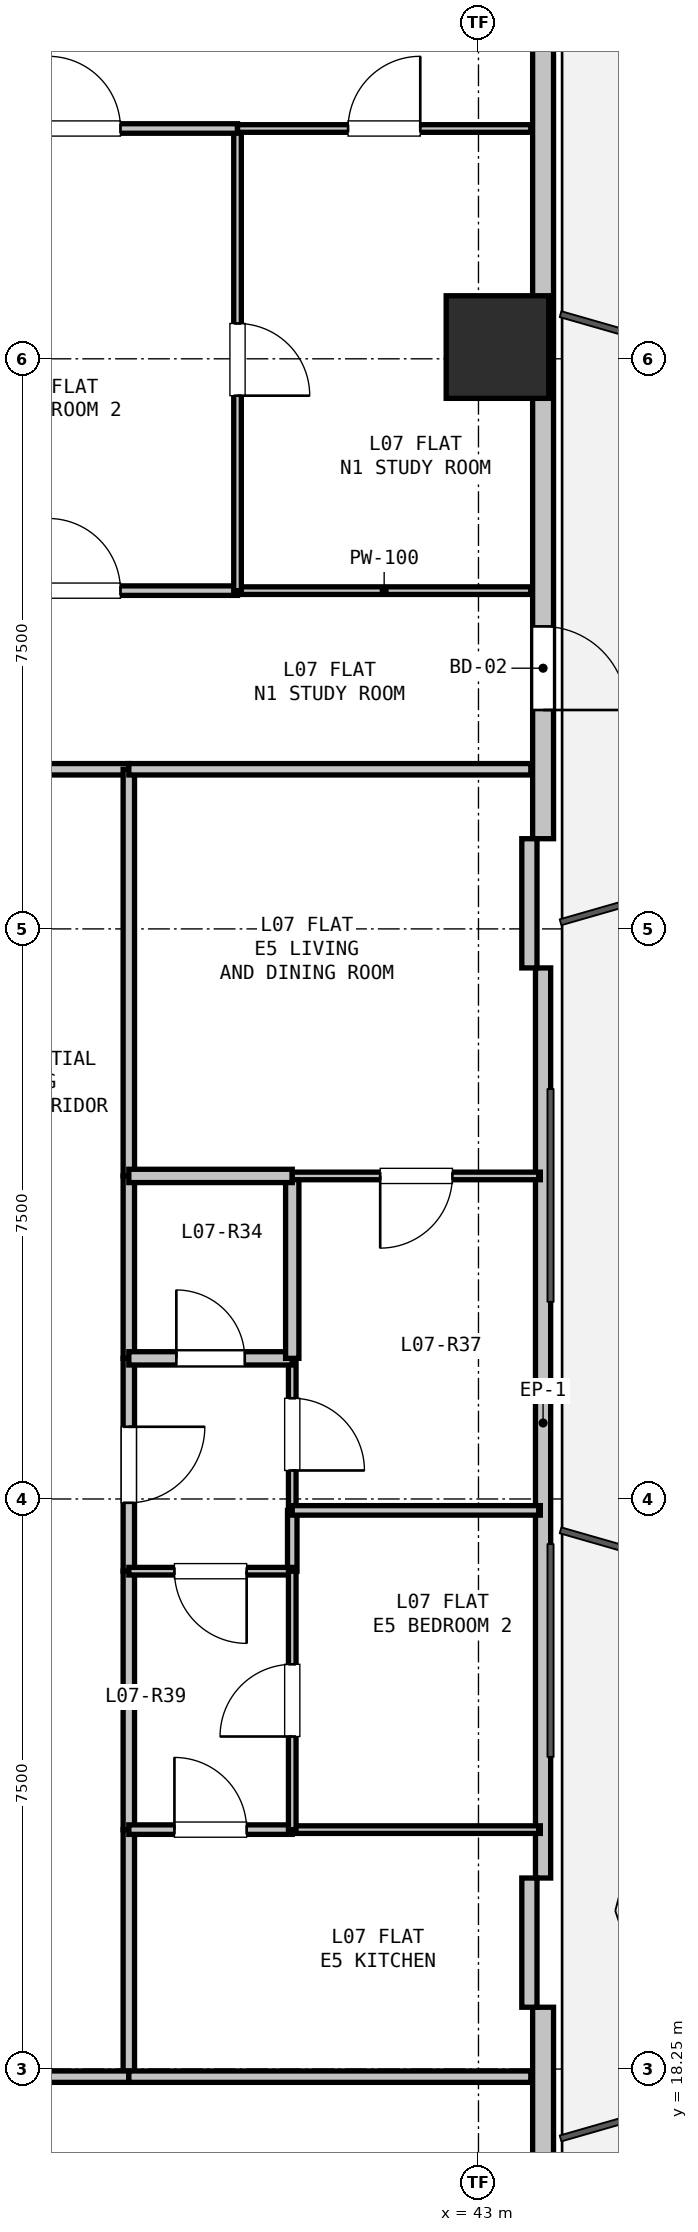
"""IFC4 building model, lengths in metres.
Left out: names, types, materials, properties, quantities, classifications, styles, units other than length and angle.
Written with IfcOpenShell. Run it as: python <this file> out.ifc"""

import sys

from ifc_helpers import new_model, si_unit, direction, frame, frame_2d, origin, origin_2d, place, context, subcontext, project, spatial, rectangle, hollow_rectangle, extrude, element, fill, save


model = new_model("IFC4")
c1 = context("Model", 3, precision=1e-05, world=origin(), true_north=direction((0.0, 1.0)))
c2 = subcontext(c1, "Body", "Model", "MODEL_VIEW")
j1 = project(units=[si_unit("LENGTHUNIT", "METRE"), si_unit("PLANEANGLEUNIT", "RADIAN")], contexts=[c1])
p1 = place(None, origin())
s1 = spatial("IfcSite", under=j1, at=p1, CompositionType="ELEMENT")
p2 = place(p1, origin())
s2 = spatial("IfcBuilding", under=s1, at=p2, CompositionType="ELEMENT")
p3 = place(p2, frame((0.0, 0.0, 29.1)))
s3 = spatial("IfcBuildingStorey", under=s2, at=p3, CompositionType="ELEMENT", Elevation=29.1)
p4 = place(p3, frame((43.25, 40.905, 0.0), z_axis=(0.0, 0.0, 1.0), x_axis=(1.0, 0.0, 0.0)))
e1 = element("IfcColumn", 1, at=p4, inside=s3, PredefinedType="COLUMN", context=c2, shape_type="SweptSolid", body=[
    extrude(hollow_rectangle(XDim=1.35, YDim=1.35, WallThickness=0.036, at=origin_2d()), origin(), (0.0, 0.0, 1.0), 3.3),
])
p5 = place(p3, frame((28.232, 43.454, 0.0), z_axis=(0.0, 0.0, 1.0), x_axis=(0.86603192154, 0.499988710747, 0.0)))
e2 = element("IfcWall", 2, at=p5, inside=s3, PredefinedType="SOLIDWALL", context=c2, shape_type="SweptSolid", body=[
    extrude(rectangle(XDim=12.673, YDim=0.275, at=frame_2d((6.336, 0.0))), origin(), (0.0, 0.0, 1.0), 2.66),
])
p6 = place(p5, frame((4.68, 0.0, 0.9)))
e3 = element("IfcOpeningElement", 3, at=p6, cuts=e2, PredefinedType="OPENING", context=c2, shape_type="SweptSolid", body=[
    extrude(rectangle(XDim=1.2, YDim=1.4, at=frame_2d((0.6, 0.7))), frame((0.0, 0.147, 0.0), z_axis=(0.0, -1.0, 0.0), x_axis=(1.0, 0.0, 0.0)), (0.0, 0.0, 1.0), 0.295),
])
p7 = place(p3, frame((43.85, 47.11, 0.0), z_axis=(0.0, 0.0, 1.0), x_axis=(0.0, -1.0, 0.0)))
e4 = element("IfcWall", 4, at=p7, inside=s3, PredefinedType="SOLIDWALL", context=c2, shape_type="SweptSolid", body=[
    extrude(rectangle(XDim=12.673, YDim=0.275, at=frame_2d((6.336, 0.0))), origin(), (0.0, 0.0, 1.0), 2.66),
])
p8 = place(p7, frame((9.88, 0.0, 0.0)))
e5 = element("IfcOpeningElement", 5, at=p8, cuts=e4, PredefinedType="OPENING", context=c2, shape_type="SweptSolid", body=[
    extrude(rectangle(XDim=1.1, YDim=2.1, at=frame_2d((0.55, 1.05))), frame((0.0, 0.147, 0.0), z_axis=(0.0, -1.0, 0.0), x_axis=(1.0, 0.0, 0.0)), (0.0, 0.0, 1.0), 0.295),
])
p9 = place(p3, frame((43.85, 32.737, 0.0), z_axis=(0.0, 0.0, 1.0), x_axis=(0.0, -1.0, 0.0)))
e6 = element("IfcWall", 6, at=p9, inside=s3, PredefinedType="PARAPET", context=c2, shape_type="SweptSolid", body=[
    extrude(rectangle(XDim=11.973, YDim=0.2, at=frame_2d((5.987, 0.0))), origin(), (0.0, 0.0, 1.0), 0.2),
])
p10 = place(p3, frame((43.85, 19.063, 0.0), z_axis=(0.0, 0.0, 1.0), x_axis=(0.0, -1.0, 0.0)))
e7 = element("IfcWall", 7, at=p10, inside=s3, PredefinedType="SOLIDWALL", context=c2, shape_type="SweptSolid", body=[
    extrude(rectangle(XDim=12.673, YDim=0.275, at=frame_2d((6.336, 0.0))), origin(), (0.0, 0.0, 1.0), 2.66),
])
for number, where, z_axis, x_axis in (
    (8, (43.67, 34.437, 0.0), (0.0, 0.0, 1.0), (0.0, -1.0, 0.0)),
    (9, (43.67, 20.763, 0.0), (0.0, 0.0, 1.0), (0.0, -1.0, 0.0)),
):
    element("IfcWall", number, at=place(p3, frame(where, z_axis=z_axis, x_axis=x_axis)), inside=s3, PredefinedType="PARAPET", context=c2, shape_type="SweptSolid", body=[
        extrude(rectangle(XDim=1.7, YDim=0.2, at=frame_2d((0.85, 0.0))), origin(), (0.0, 0.0, 1.0), 2.66),
    ])
p11 = place(p3, frame((35.8, 35.35, 0.0), z_axis=(0.0, 0.0, 1.0), x_axis=(1.0, 0.0, 0.0)))
e10 = element("IfcWall", 10, at=p11, inside=s3, PredefinedType="PARTITIONING", context=c2, shape_type="SweptSolid", body=[
    extrude(rectangle(XDim=2.6, YDim=0.15, at=frame_2d((1.3, 0.0))), origin(), (0.0, 0.0, 1.0), 2.337),
])
p12 = place(p3, frame((38.4, 35.35, 0.0), z_axis=(0.0, 0.0, 1.0), x_axis=(0.0, -1.0, 0.0)))
e11 = element("IfcWall", 11, at=p12, inside=s3, PredefinedType="PARTITIONING", context=c2, shape_type="SweptSolid", body=[
    extrude(rectangle(XDim=5.35, YDim=0.15, at=frame_2d((2.675, 0.0))), origin(), (0.0, 0.0, 1.0), 2.337),
])
p13 = place(p3, frame((38.4, 30.0, 0.0), z_axis=(0.0, 0.0, 1.0), x_axis=(0.0, -1.0, 0.0)))
e12 = element("IfcWall", 12, at=p13, inside=s3, PredefinedType="PARTITIONING", context=c2, shape_type="SweptSolid", body=[
    extrude(rectangle(XDim=2.4, YDim=0.15, at=frame_2d((1.2, 0.0))), origin(), (0.0, 0.0, 1.0), 3.04),
])
p14 = place(p3, frame((38.4, 27.6, 0.0), z_axis=(0.0, 0.0, 1.0), x_axis=(0.0, -1.0, 0.0)))
e13 = element("IfcWall", 13, at=p14, inside=s3, PredefinedType="PARTITIONING", context=c2, shape_type="SweptSolid", body=[
    extrude(rectangle(XDim=2.8, YDim=0.15, at=frame_2d((1.4, 0.0))), origin(), (0.0, 0.0, 1.0), 3.04),
])
p15 = place(p14, frame((0.9, 0.0, 0.0)))
e14 = element("IfcOpeningElement", 14, at=p15, cuts=e13, PredefinedType="OPENING", context=c2, shape_type="SweptSolid", body=[
    extrude(rectangle(XDim=1.0, YDim=2.15, at=frame_2d((0.5, 1.075))), frame((0.0, 0.085, 0.0), z_axis=(0.0, -1.0, 0.0), x_axis=(1.0, 0.0, 0.0)), (0.0, 0.0, 1.0), 0.17),
])
p16 = place(p3, frame((38.4, 24.8, 0.0), z_axis=(0.0, 0.0, 1.0), x_axis=(0.0, -1.0, 0.0)))
e15 = element("IfcWall", 15, at=p16, inside=s3, PredefinedType="PARTITIONING", context=c2, shape_type="SweptSolid", body=[
    extrude(rectangle(XDim=3.4, YDim=0.15, at=frame_2d((1.7, 0.0))), origin(), (0.0, 0.0, 1.0), 3.04),
])
p17 = place(p3, frame((38.4, 21.4, 0.0), z_axis=(0.0, 0.0, 1.0), x_axis=(0.0, -1.0, 0.0)))
e16 = element("IfcWall", 16, at=p17, inside=s3, PredefinedType="PARTITIONING", context=c2, shape_type="SweptSolid", body=[
    extrude(rectangle(XDim=3.25, YDim=0.15, at=frame_2d((1.625, 0.0))), origin(), (0.0, 0.0, 1.0), 3.04),
])
p18 = place(p3, frame((38.4, 18.15, 0.0), z_axis=(0.0, 0.0, 1.0), x_axis=(-1.0, 0.0, 0.0)))
e17 = element("IfcWall", 17, at=p18, inside=s3, PredefinedType="PARTITIONING", context=c2, shape_type="SweptSolid", body=[
    extrude(rectangle(XDim=2.6, YDim=0.15, at=frame_2d((1.3, 0.0))), origin(), (0.0, 0.0, 1.0), 2.337),
])
p19 = place(p3, frame((40.55, 27.6, 0.0), z_axis=(0.0, 0.0, 1.0), x_axis=(0.0, -1.0, 0.0)))
e18 = element("IfcWall", 18, at=p19, inside=s3, PredefinedType="PARTITIONING", context=c2, shape_type="SweptSolid", body=[
    extrude(rectangle(XDim=2.0, YDim=0.1, at=frame_2d((1.0, 0.0))), origin(), (0.0, 0.0, 1.0), 3.04),
])
p20 = place(p19, frame((0.525, 0.0, 0.0)))
e19 = element("IfcOpeningElement", 19, at=p20, cuts=e18, PredefinedType="OPENING", context=c2, shape_type="SweptSolid", body=[
    extrude(rectangle(XDim=0.95, YDim=2.1, at=frame_2d((0.475, 1.05))), frame((0.0, 0.06, 0.0), z_axis=(0.0, -1.0, 0.0), x_axis=(1.0, 0.0, 0.0)), (0.0, 0.0, 1.0), 0.12),
])
p21 = place(p3, frame((40.55, 25.6, 0.0), z_axis=(0.0, 0.0, 1.0), x_axis=(0.0, -1.0, 0.0)))
e20 = element("IfcWall", 20, at=p21, inside=s3, PredefinedType="PARTITIONING", context=c2, shape_type="SweptSolid", body=[
    extrude(rectangle(XDim=0.8, YDim=0.125, at=frame_2d((0.4, 0.0))), origin(), (0.0, 0.0, 1.0), 3.04),
])
p22 = place(p3, frame((40.55, 24.8, 0.0), z_axis=(0.0, 0.0, 1.0), x_axis=(-1.0, 0.0, 0.0)))
e21 = element("IfcWall", 21, at=p22, inside=s3, PredefinedType="PARTITIONING", context=c2, shape_type="SweptSolid", body=[
    extrude(rectangle(XDim=2.15, YDim=0.1, at=frame_2d((1.075, 0.0))), origin(), (0.0, 0.0, 1.0), 3.04),
])
p23 = place(p22, frame((0.6, 0.0, 0.0)))
e22 = element("IfcOpeningElement", 22, at=p23, cuts=e21, PredefinedType="OPENING", context=c2, shape_type="SweptSolid", body=[
    extrude(rectangle(XDim=0.95, YDim=2.1, at=frame_2d((0.475, 1.05))), frame((0.0, 0.06, 0.0), z_axis=(0.0, -1.0, 0.0), x_axis=(1.0, 0.0, 0.0)), (0.0, 0.0, 1.0), 0.12),
])
p24 = place(p3, frame((38.4, 27.6, 0.0), z_axis=(0.0, 0.0, 1.0), x_axis=(1.0, 0.0, 0.0)))
e23 = element("IfcWall", 23, at=p24, inside=s3, PredefinedType="PLUMBINGWALL", context=c2, shape_type="SweptSolid", body=[
    extrude(rectangle(XDim=2.15, YDim=0.175, at=frame_2d((1.075, 0.0))), origin(), (0.0, 0.0, 1.0), 3.04),
])
p25 = place(p24, frame((0.625, 0.0, 0.0)))
e24 = element("IfcOpeningElement", 24, at=p25, cuts=e23, PredefinedType="OPENING", context=c2, shape_type="SweptSolid", body=[
    extrude(rectangle(XDim=0.9, YDim=2.1, at=frame_2d((0.45, 1.05))), frame((0.0, 0.097, 0.0), z_axis=(0.0, -1.0, 0.0), x_axis=(1.0, 0.0, 0.0)), (0.0, 0.0, 1.0), 0.195),
])
p26 = place(p3, frame((38.4, 18.15, 0.0), z_axis=(0.0, 0.0, 1.0), x_axis=(1.0, 0.0, 0.0)))
e25 = element("IfcWall", 25, at=p26, inside=s3, PredefinedType="PARTITIONING", context=c2, shape_type="SweptSolid", body=[
    extrude(rectangle(XDim=5.289, YDim=0.15, at=frame_2d((2.644, 0.0))), origin(), (0.0, 0.0, 1.0), 2.365),
])
p27 = place(p3, frame((40.55, 30.0, 0.0), z_axis=(0.0, 0.0, 1.0), x_axis=(0.0, -1.0, 0.0)))
e26 = element("IfcWall", 26, at=p27, inside=s3, PredefinedType="PLUMBINGWALL", context=c2, shape_type="SweptSolid", body=[
    extrude(rectangle(XDim=2.4, YDim=0.175, at=frame_2d((1.2, 0.0))), origin(), (0.0, 0.0, 1.0), 3.04),
])
p28 = place(p3, frame((38.4, 30.0, 0.0), z_axis=(0.0, 0.0, 1.0), x_axis=(1.0, 0.0, 0.0)))
e27 = element("IfcWall", 27, at=p28, inside=s3, PredefinedType="PLUMBINGWALL", context=c2, shape_type="SweptSolid", body=[
    extrude(rectangle(XDim=2.15, YDim=0.175, at=frame_2d((1.075, 0.0))), origin(), (0.0, 0.0, 1.0), 3.04),
])
p29 = place(p3, frame((38.4, 21.4, 0.0), z_axis=(0.0, 0.0, 1.0), x_axis=(1.0, 0.0, 0.0)))
e28 = element("IfcWall", 28, at=p29, inside=s3, PredefinedType="PARTITIONING", context=c2, shape_type="SweptSolid", body=[
    extrude(rectangle(XDim=2.15, YDim=0.125, at=frame_2d((1.075, 0.0))), origin(), (0.0, 0.0, 1.0), 3.04),
])
p30 = place(p29, frame((0.6, 0.0, 0.0)))
e29 = element("IfcOpeningElement", 29, at=p30, cuts=e28, PredefinedType="OPENING", context=c2, shape_type="SweptSolid", body=[
    extrude(rectangle(XDim=0.95, YDim=2.1, at=frame_2d((0.475, 1.05))), frame((0.0, 0.073, 0.0), z_axis=(0.0, -1.0, 0.0), x_axis=(1.0, 0.0, 0.0)), (0.0, 0.0, 1.0), 0.145),
])
p31 = place(p3, frame((40.55, 21.4, 0.0), z_axis=(0.0, 0.0, 1.0), x_axis=(1.0, 0.0, 0.0)))
e30 = element("IfcWall", 30, at=p31, inside=s3, PredefinedType="PARTITIONING", context=c2, shape_type="SweptSolid", body=[
    extrude(rectangle(XDim=3.264, YDim=0.1, at=frame_2d((1.632, 0.0))), origin(), (0.0, 0.0, 1.0), 2.365),
])
p32 = place(p3, frame((43.688, 35.35, 0.0), z_axis=(0.0, 0.0, 1.0), x_axis=(-1.0, 0.0, 0.0)))
e31 = element("IfcWall", 31, at=p32, inside=s3, PredefinedType="PARTITIONING", context=c2, shape_type="SweptSolid", body=[
    extrude(rectangle(XDim=5.289, YDim=0.15, at=frame_2d((2.644, 0.0))), origin(), (0.0, 0.0, 1.0), 2.337),
])
p33 = place(p3, frame((35.8, 37.7, 0.0), z_axis=(0.0, 0.0, 1.0), x_axis=(1.0, 0.0, 0.0)))
e32 = element("IfcWall", 32, at=p33, inside=s3, PredefinedType="PARTITIONING", context=c2, shape_type="SweptSolid", body=[
    extrude(rectangle(XDim=4.03, YDim=0.125, at=frame_2d((2.015, 0.0))), origin(), (0.0, 0.0, 1.0), 2.337),
])
p34 = place(p33, frame((1.54, 0.0, 0.0)))
e33 = element("IfcOpeningElement", 33, at=p34, cuts=e32, PredefinedType="OPENING", context=c2, shape_type="SweptSolid", body=[
    extrude(rectangle(XDim=0.95, YDim=2.1, at=frame_2d((0.475, 1.05))), frame((0.0, 0.073, 0.0), z_axis=(0.0, -1.0, 0.0), x_axis=(1.0, 0.0, 0.0)), (0.0, 0.0, 1.0), 0.145),
])
p35 = place(p3, frame((39.83, 37.7, 0.0), z_axis=(0.0, 0.0, 1.0), x_axis=(1.0, 0.0, 0.0)))
e34 = element("IfcWall", 34, at=p35, inside=s3, PredefinedType="PARTITIONING", context=c2, shape_type="SweptSolid", body=[
    extrude(rectangle(XDim=3.858, YDim=0.1, at=frame_2d((1.929, 0.0))), origin(), (0.0, 0.0, 1.0), 2.337),
])
p36 = place(p3, frame((39.83, 43.78, 0.0), z_axis=(0.0, 0.0, 1.0), x_axis=(0.0, -1.0, 0.0)))
e35 = element("IfcWall", 35, at=p36, inside=s3, PredefinedType="PARTITIONING", context=c2, shape_type="SweptSolid", body=[
    extrude(rectangle(XDim=6.08, YDim=0.1, at=frame_2d((3.04, 0.0))), origin(), (0.0, 0.0, 1.0), 3.04),
])
p37 = place(p36, frame((2.565, 0.0, 0.0)))
e36 = element("IfcOpeningElement", 36, at=p37, cuts=e35, PredefinedType="OPENING", context=c2, shape_type="SweptSolid", body=[
    extrude(rectangle(XDim=0.95, YDim=2.1, at=frame_2d((0.475, 1.05))), frame((0.0, 0.06, 0.0), z_axis=(0.0, -1.0, 0.0), x_axis=(1.0, 0.0, 0.0)), (0.0, 0.0, 1.0), 0.12),
])
p38 = place(p3, frame((35.8, 43.78, 0.0), z_axis=(0.0, 0.0, 1.0), x_axis=(1.0, 0.0, 0.0)))
e37 = element("IfcWall", 37, at=p38, inside=s3, PredefinedType="PARTITIONING", context=c2, shape_type="SweptSolid", body=[
    extrude(rectangle(XDim=4.03, YDim=0.125, at=frame_2d((2.015, 0.0))), origin(), (0.0, 0.0, 1.0), 2.337),
])
p39 = place(p38, frame((1.54, 0.0, 0.0)))
e38 = element("IfcOpeningElement", 38, at=p39, cuts=e37, PredefinedType="OPENING", context=c2, shape_type="SweptSolid", body=[
    extrude(rectangle(XDim=0.95, YDim=2.1, at=frame_2d((0.475, 1.05))), frame((0.0, 0.073, 0.0), z_axis=(0.0, -1.0, 0.0), x_axis=(1.0, 0.0, 0.0)), (0.0, 0.0, 1.0), 0.145),
])
p40 = place(p3, frame((39.83, 43.78, 0.0), z_axis=(0.0, 0.0, 1.0), x_axis=(1.0, 0.0, 0.0)))
e39 = element("IfcWall", 39, at=p40, inside=s3, PredefinedType="PARTITIONING", context=c2, shape_type="SweptSolid", body=[
    extrude(rectangle(XDim=3.858, YDim=0.1, at=frame_2d((1.929, 0.0))), origin(), (0.0, 0.0, 1.0), 2.65),
])
p41 = place(p40, frame((1.454, 0.0, 0.0)))
e40 = element("IfcOpeningElement", 40, at=p41, cuts=e39, PredefinedType="OPENING", context=c2, shape_type="SweptSolid", body=[
    extrude(rectangle(XDim=0.95, YDim=2.1, at=frame_2d((0.475, 1.05))), frame((0.0, 0.06, 0.0), z_axis=(0.0, -1.0, 0.0), x_axis=(1.0, 0.0, 0.0)), (0.0, 0.0, 1.0), 0.12),
])
p42 = place(p3, frame((43.814, 30.0, 0.0), z_axis=(0.0, 0.0, 1.0), x_axis=(-1.0, 0.0, 0.0)))
e41 = element("IfcWall", 41, at=p42, inside=s3, PredefinedType="PARTITIONING", context=c2, shape_type="SweptSolid", body=[
    extrude(rectangle(XDim=3.264, YDim=0.1, at=frame_2d((1.632, 0.0))), origin(), (0.0, 0.0, 1.0), 2.365),
])
p43 = place(p42, frame((1.157, 0.0, 0.0)))
e42 = element("IfcOpeningElement", 42, at=p43, cuts=e41, PredefinedType="OPENING", context=c2, shape_type="SweptSolid", body=[
    extrude(rectangle(XDim=0.95, YDim=2.1, at=frame_2d((0.475, 1.05))), frame((0.0, 0.06, 0.0), z_axis=(0.0, -1.0, 0.0), x_axis=(1.0, 0.0, 0.0)), (0.0, 0.0, 1.0), 0.12),
])
p44 = place(p3, frame((43.814, 25.6, 0.0), z_axis=(0.0, 0.0, 1.0), x_axis=(-1.0, 0.0, 0.0)))
e43 = element("IfcWall", 43, at=p44, inside=s3, PredefinedType="PARTITIONING", context=c2, shape_type="SweptSolid", body=[
    extrude(rectangle(XDim=3.264, YDim=0.125, at=frame_2d((1.632, 0.0))), origin(), (0.0, 0.0, 1.0), 2.365),
])
p45 = place(p3, frame((40.55, 21.4, 0.0), z_axis=(0.0, 0.0, 1.0), x_axis=(0.0, 1.0, 0.0)))
e44 = element("IfcWall", 44, at=p45, inside=s3, PredefinedType="PARTITIONING", context=c2, shape_type="SweptSolid", body=[
    extrude(rectangle(XDim=3.4, YDim=0.1, at=frame_2d((1.7, 0.0))), origin(), (0.0, 0.0, 1.0), 3.04),
])
p46 = place(p45, frame((1.225, 0.0, 0.0)))
e45 = element("IfcOpeningElement", 45, at=p46, cuts=e44, PredefinedType="OPENING", context=c2, shape_type="SweptSolid", body=[
    extrude(rectangle(XDim=0.95, YDim=2.1, at=frame_2d((0.475, 1.05))), frame((0.0, 0.06, 0.0), z_axis=(0.0, -1.0, 0.0), x_axis=(1.0, 0.0, 0.0)), (0.0, 0.0, 1.0), 0.12),
])
p47 = place(p8, origin())
e46 = element("IfcDoor", 46, at=p47, inside=s3, OperationType="SINGLE_SWING_RIGHT", PredefinedType="DOOR", context=c2, shape_type="SweptSolid", body=[
    extrude(rectangle(XDim=1.1, YDim=2.1, at=frame_2d((0.55, 1.05))), frame((0.0, 0.025, 0.0), z_axis=(0.0, -1.0, 0.0), x_axis=(1.0, 0.0, 0.0)), (0.0, 0.0, 1.0), 0.05),
])
fill(e5, e46)
p48 = place(p15, origin())
e47 = element("IfcDoor", 47, at=p48, inside=s3, OperationType="SINGLE_SWING_LEFT", PredefinedType="DOOR", context=c2, shape_type="SweptSolid", body=[
    extrude(rectangle(XDim=1.0, YDim=2.15, at=frame_2d((0.5, 1.075))), frame((0.0, 0.025, 0.0), z_axis=(0.0, -1.0, 0.0), x_axis=(1.0, 0.0, 0.0)), (0.0, 0.0, 1.0), 0.05),
])
fill(e14, e47)
p49 = place(p25, origin())
e48 = element("IfcDoor", 48, at=p49, inside=s3, OperationType="SINGLE_SWING_LEFT", PredefinedType="DOOR", context=c2, shape_type="SweptSolid", body=[
    extrude(rectangle(XDim=0.9, YDim=2.1, at=frame_2d((0.45, 1.05))), frame((0.0, 0.025, 0.0), z_axis=(0.0, -1.0, 0.0), x_axis=(1.0, 0.0, 0.0)), (0.0, 0.0, 1.0), 0.05),
])
fill(e24, e48)
p50 = place(p20, origin())
e49 = element("IfcDoor", 49, at=p50, inside=s3, OperationType="SINGLE_SWING_RIGHT", PredefinedType="DOOR", context=c2, shape_type="SweptSolid", body=[
    extrude(rectangle(XDim=0.95, YDim=2.1, at=frame_2d((0.475, 1.05))), frame((0.0, 0.025, 0.0), z_axis=(0.0, -1.0, 0.0), x_axis=(1.0, 0.0, 0.0)), (0.0, 0.0, 1.0), 0.05),
])
fill(e19, e49)
p51 = place(p23, origin())
e50 = element("IfcDoor", 50, at=p51, inside=s3, OperationType="SINGLE_SWING_LEFT", PredefinedType="DOOR", context=c2, shape_type="SweptSolid", body=[
    extrude(rectangle(XDim=0.95, YDim=2.1, at=frame_2d((0.475, 1.05))), frame((0.0, 0.025, 0.0), z_axis=(0.0, -1.0, 0.0), x_axis=(1.0, 0.0, 0.0)), (0.0, 0.0, 1.0), 0.05),
])
fill(e22, e50)
p52 = place(p30, origin())
e51 = element("IfcDoor", 51, at=p52, inside=s3, OperationType="SINGLE_SWING_LEFT", PredefinedType="DOOR", context=c2, shape_type="SweptSolid", body=[
    extrude(rectangle(XDim=0.95, YDim=2.1, at=frame_2d((0.475, 1.05))), frame((0.0, 0.025, 0.0), z_axis=(0.0, -1.0, 0.0), x_axis=(1.0, 0.0, 0.0)), (0.0, 0.0, 1.0), 0.05),
])
fill(e29, e51)
p53 = place(p34, origin())
e52 = element("IfcDoor", 52, at=p53, inside=s3, OperationType="SINGLE_SWING_LEFT", PredefinedType="DOOR", context=c2, shape_type="SweptSolid", body=[
    extrude(rectangle(XDim=0.95, YDim=2.1, at=frame_2d((0.475, 1.05))), frame((0.0, 0.025, 0.0), z_axis=(0.0, -1.0, 0.0), x_axis=(1.0, 0.0, 0.0)), (0.0, 0.0, 1.0), 0.05),
])
fill(e33, e52)
p54 = place(p37, origin())
e53 = element("IfcDoor", 53, at=p54, inside=s3, OperationType="SINGLE_SWING_RIGHT", PredefinedType="DOOR", context=c2, shape_type="SweptSolid", body=[
    extrude(rectangle(XDim=0.95, YDim=2.1, at=frame_2d((0.475, 1.05))), frame((0.0, 0.025, 0.0), z_axis=(0.0, -1.0, 0.0), x_axis=(1.0, 0.0, 0.0)), (0.0, 0.0, 1.0), 0.05),
])
fill(e36, e53)
p55 = place(p39, origin())
e54 = element("IfcDoor", 54, at=p55, inside=s3, OperationType="SINGLE_SWING_LEFT", PredefinedType="DOOR", context=c2, shape_type="SweptSolid", body=[
    extrude(rectangle(XDim=0.95, YDim=2.1, at=frame_2d((0.475, 1.05))), frame((0.0, 0.025, 0.0), z_axis=(0.0, -1.0, 0.0), x_axis=(1.0, 0.0, 0.0)), (0.0, 0.0, 1.0), 0.05),
])
fill(e38, e54)
p56 = place(p41, origin())
e55 = element("IfcDoor", 55, at=p56, inside=s3, OperationType="SINGLE_SWING_RIGHT", PredefinedType="DOOR", context=c2, shape_type="SweptSolid", body=[
    extrude(rectangle(XDim=0.95, YDim=2.1, at=frame_2d((0.475, 1.05))), frame((0.0, 0.025, 0.0), z_axis=(0.0, -1.0, 0.0), x_axis=(1.0, 0.0, 0.0)), (0.0, 0.0, 1.0), 0.05),
])
fill(e40, e55)
p57 = place(p43, origin())
e56 = element("IfcDoor", 56, at=p57, inside=s3, OperationType="SINGLE_SWING_RIGHT", PredefinedType="DOOR", context=c2, shape_type="SweptSolid", body=[
    extrude(rectangle(XDim=0.95, YDim=2.1, at=frame_2d((0.475, 1.05))), frame((0.0, 0.025, 0.0), z_axis=(0.0, -1.0, 0.0), x_axis=(1.0, 0.0, 0.0)), (0.0, 0.0, 1.0), 0.05),
])
fill(e42, e56)
p58 = place(p46, origin())
e57 = element("IfcDoor", 57, at=p58, inside=s3, OperationType="SINGLE_SWING_LEFT", PredefinedType="DOOR", context=c2, shape_type="SweptSolid", body=[
    extrude(rectangle(XDim=0.95, YDim=2.1, at=frame_2d((0.475, 1.05))), frame((0.0, 0.025, 0.0), z_axis=(0.0, -1.0, 0.0), x_axis=(1.0, 0.0, 0.0)), (0.0, 0.0, 1.0), 0.05),
])
fill(e45, e57)
save(model, sys.argv[1])
